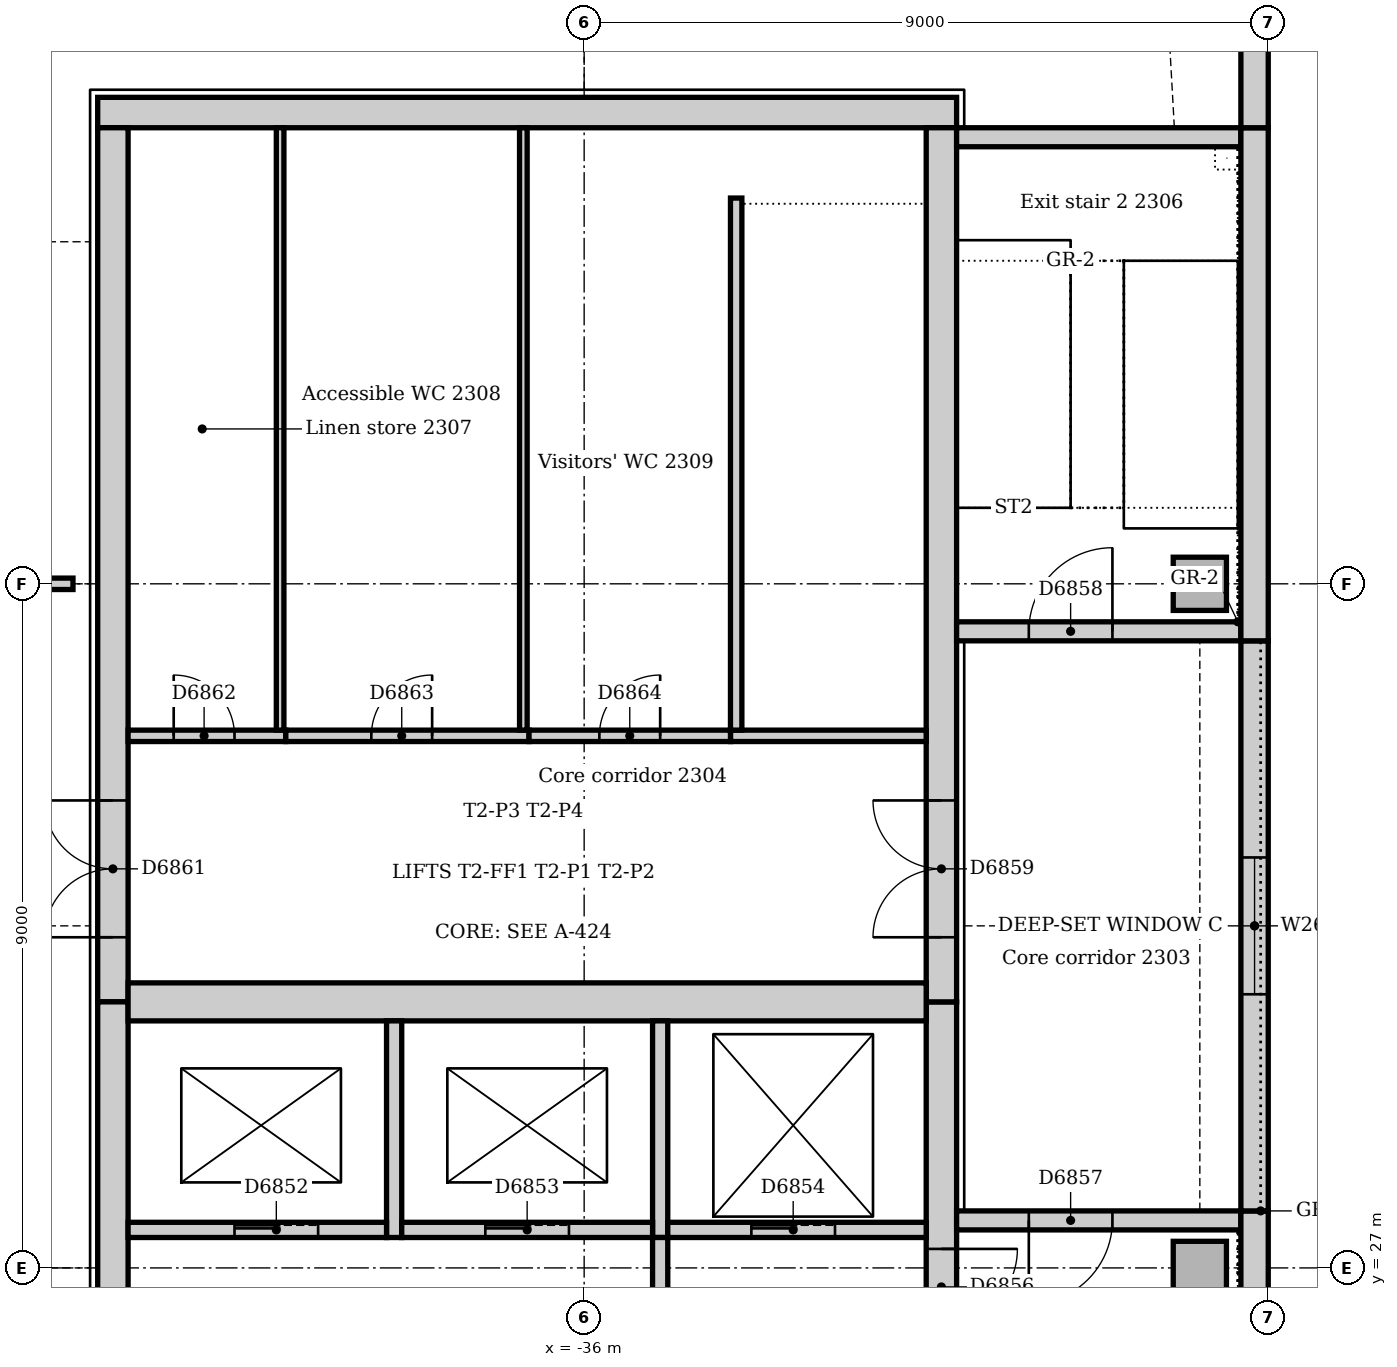
"""IFC4 building model, lengths in metres.
Left out: names, types, materials, properties, quantities, classifications, styles, units other than length and angle.
Written with IfcOpenShell. Run it as: python <this file> out.ifc"""

import sys

from ifc_helpers import new_model, si_unit, direction, frame, frame_2d, origin, origin_2d, place, context, subcontext, project, spatial, rectangle, extrude, element, fill, save


model = new_model("IFC4")
c1 = context("Model", 3, precision=1e-05, world=origin(), true_north=direction((0.0, 1.0)))
c2 = subcontext(c1, "Body", "Model", "MODEL_VIEW")
j1 = project(units=[si_unit("LENGTHUNIT", "METRE"), si_unit("PLANEANGLEUNIT", "RADIAN")], contexts=[c1])
p1 = place(None, origin())
s1 = spatial("IfcSite", under=j1, at=p1, CompositionType="ELEMENT")
p2 = place(p1, origin())
s2 = spatial("IfcBuilding", under=s1, at=p2, CompositionType="ELEMENT")
p3 = place(p2, frame((0.0, 0.0, 100.0)))
s3 = spatial("IfcBuildingStorey", under=s2, at=p3, CompositionType="ELEMENT", Elevation=100.0)
p4 = place(p3, frame((-31.1, 42.2, 0.0), z_axis=(0.0, 0.0, 1.0), x_axis=(-1.0, 0.0, 0.0)))
e1 = element("IfcWall", 1, at=p4, inside=s3, PredefinedType="SOLIDWALL", context=c2, shape_type="SweptSolid", body=[
    extrude(rectangle(XDim=11.3, YDim=0.4, at=frame_2d((5.65, 0.0))), origin(), (0.0, 0.0, 1.0), 4.0),
])
p5 = place(p3, frame((-31.3, 21.0, 0.0), z_axis=(0.0, 0.0, 1.0), x_axis=(0.0, 1.0, 0.0)))
e2 = element("IfcWall", 2, at=p5, inside=s3, PredefinedType="SOLIDWALL", context=c2, shape_type="SweptSolid", body=[
    extrude(rectangle(XDim=9.5, YDim=0.4, at=frame_2d((4.75, 0.0))), origin(), (0.0, 0.0, 1.0), 4.0),
])
p6 = place(p5, frame((5.25, 0.0, 0.0)))
e3 = element("IfcOpeningElement", 3, at=p6, cuts=e2, PredefinedType="OPENING", context=c2, shape_type="SweptSolid", body=[
    extrude(rectangle(XDim=1.0, YDim=2.1, at=frame_2d((0.5, 1.05))), frame((0.0, 0.21, 0.0), z_axis=(0.0, -1.0, 0.0), x_axis=(1.0, 0.0, 0.0)), (0.0, 0.0, 1.0), 0.42),
])
p7 = place(p3, frame((-31.3, 30.5, 0.0), z_axis=(0.0, 0.0, 1.0), x_axis=(0.0, 1.0, 0.0)))
e4 = element("IfcWall", 4, at=p7, inside=s3, PredefinedType="SOLIDWALL", context=c2, shape_type="SweptSolid", body=[
    extrude(rectangle(XDim=11.5, YDim=0.4, at=frame_2d((5.75, 0.0))), origin(), (0.0, 0.0, 1.0), 4.0),
])
p8 = place(p7, frame((0.85, 0.0, 0.0)))
e5 = element("IfcOpeningElement", 5, at=p8, cuts=e4, PredefinedType="OPENING", context=c2, shape_type="SweptSolid", body=[
    extrude(rectangle(XDim=1.8, YDim=2.1, at=frame_2d((0.9, 1.05))), frame((0.0, 0.21, 0.0), z_axis=(0.0, -1.0, 0.0), x_axis=(1.0, 0.0, 0.0)), (0.0, 0.0, 1.0), 0.42),
])
p9 = place(p3, frame((-42.2, 42.0, 0.0), z_axis=(0.0, 0.0, 1.0), x_axis=(0.0, -1.0, 0.0)))
e6 = element("IfcWall", 6, at=p9, inside=s3, PredefinedType="SOLIDWALL", context=c2, shape_type="SweptSolid", body=[
    extrude(rectangle(XDim=11.5, YDim=0.4, at=frame_2d((5.75, 0.0))), origin(), (0.0, 0.0, 1.0), 4.0),
])
p10 = place(p9, frame((8.85, 0.0, 0.0)))
e7 = element("IfcOpeningElement", 7, at=p10, cuts=e6, PredefinedType="OPENING", context=c2, shape_type="SweptSolid", body=[
    extrude(rectangle(XDim=1.8, YDim=2.1, at=frame_2d((0.9, 1.05))), frame((0.0, 0.21, 0.0), z_axis=(0.0, -1.0, 0.0), x_axis=(1.0, 0.0, 0.0)), (0.0, 0.0, 1.0), 0.42),
])
p11 = place(p3, frame((-42.2, 30.5, 0.0), z_axis=(0.0, 0.0, 1.0), x_axis=(0.0, -1.0, 0.0)))
e8 = element("IfcWall", 8, at=p11, inside=s3, PredefinedType="SOLIDWALL", context=c2, shape_type="SweptSolid", body=[
    extrude(rectangle(XDim=9.5, YDim=0.4, at=frame_2d((4.75, 0.0))), origin(), (0.0, 0.0, 1.0), 4.0),
])
p12 = place(p11, frame((3.85, 0.0, 0.0)))
e9 = element("IfcOpeningElement", 9, at=p12, cuts=e8, PredefinedType="OPENING", context=c2, shape_type="SweptSolid", body=[
    extrude(rectangle(XDim=1.8, YDim=2.1, at=frame_2d((0.9, 1.05))), frame((0.0, 0.21, 0.0), z_axis=(0.0, -1.0, 0.0), x_axis=(1.0, 0.0, 0.0)), (0.0, 0.0, 1.0), 0.42),
])
p13 = place(p3, frame((-42.0, 30.5, 0.0), z_axis=(0.0, 0.0, 1.0), x_axis=(1.0, 0.0, 0.0)))
e10 = element("IfcWall", 10, at=p13, inside=s3, PredefinedType="SOLIDWALL", context=c2, shape_type="SweptSolid", body=[
    extrude(rectangle(XDim=10.5, YDim=0.5, at=frame_2d((5.25, 0.0))), origin(), (0.0, 0.0, 1.0), 4.0),
])
p14 = place(p3, frame((-27.36, 27.625, 0.0), z_axis=(0.0, 0.0, 1.0), x_axis=(-1.0, 0.0, 0.0)))
e11 = element("IfcWall", 11, at=p14, inside=s3, PredefinedType="SOLIDWALL", context=c2, shape_type="SweptSolid", body=[
    extrude(rectangle(XDim=3.74, YDim=0.25, at=frame_2d((1.87, 0.0))), origin(), (0.0, 0.0, 1.0), 4.0),
])
p15 = place(p14, frame((1.69, 0.0, 0.0)))
e12 = element("IfcOpeningElement", 12, at=p15, cuts=e11, PredefinedType="OPENING", context=c2, shape_type="SweptSolid", body=[
    extrude(rectangle(XDim=1.1, YDim=2.1, at=frame_2d((0.55, 1.05))), frame((0.0, 0.135, 0.0), z_axis=(0.0, -1.0, 0.0), x_axis=(1.0, 0.0, 0.0)), (0.0, 0.0, 1.0), 0.27),
])
p16 = place(p3, frame((-31.1, 35.375, 0.0), z_axis=(0.0, 0.0, 1.0), x_axis=(1.0, 0.0, 0.0)))
e13 = element("IfcWall", 13, at=p16, inside=s3, PredefinedType="SOLIDWALL", context=c2, shape_type="SweptSolid", body=[
    extrude(rectangle(XDim=3.74, YDim=0.25, at=frame_2d((1.87, 0.0))), origin(), (0.0, 0.0, 1.0), 4.0),
])
p17 = place(p16, frame((0.95, 0.0, 0.0)))
e14 = element("IfcOpeningElement", 14, at=p17, cuts=e13, PredefinedType="OPENING", context=c2, shape_type="SweptSolid", body=[
    extrude(rectangle(XDim=1.1, YDim=2.1, at=frame_2d((0.55, 1.05))), frame((0.0, 0.135, 0.0), z_axis=(0.0, -1.0, 0.0), x_axis=(1.0, 0.0, 0.0)), (0.0, 0.0, 1.0), 0.27),
])
p18 = place(p3, frame((-27.36, 41.875, 0.0), z_axis=(0.0, 0.0, 1.0), x_axis=(-1.0, 0.0, 0.0)))
e15 = element("IfcWall", 15, at=p18, inside=s3, PredefinedType="SOLIDWALL", context=c2, shape_type="SweptSolid", body=[
    extrude(rectangle(XDim=3.74, YDim=0.25, at=frame_2d((1.87, 0.0))), origin(), (0.0, 0.0, 1.0), 4.0),
])
for number, where, z_axis, x_axis in (
    (16, (-27.9, 27.0, 0.0), (0.0, 0.0, 1.0), (1.0, 0.0, 0.0)),
    (17, (-27.9, 36.0, 0.0), (0.0, 0.0, 1.0), (1.0, 0.0, 0.0)),
):
    element("IfcColumn", number, at=place(p3, frame(where, z_axis=z_axis, x_axis=x_axis)), inside=s3, PredefinedType="COLUMN", context=c2, shape_type="SweptSolid", body=[
        extrude(rectangle(XDim=0.7, YDim=0.7, at=origin_2d()), origin(), (0.0, 0.0, 1.0), 4.0),
    ])
p19 = place(p3, frame((-27.18, 21.0, 0.0), z_axis=(0.0, 0.0, 1.0), x_axis=(0.0, 1.0, 0.0)))
e18 = element("IfcWall", 18, at=p19, inside=s3, PredefinedType="STANDARD", context=c2, shape_type="SweptSolid", body=[
    extrude(rectangle(XDim=6.75, YDim=0.36, at=frame_2d((3.375, 0.0))), origin(), (0.0, 0.0, 1.0), 3.85),
])
p20 = place(p3, frame((-27.18, 27.75, 0.0), z_axis=(0.0, 0.0, 1.0), x_axis=(0.0, 1.0, 0.0)))
e19 = element("IfcWall", 19, at=p20, inside=s3, PredefinedType="STANDARD", context=c2, shape_type="SweptSolid", body=[
    extrude(rectangle(XDim=7.5, YDim=0.36, at=frame_2d((3.75, 0.0))), origin(), (0.0, 0.0, 1.0), 3.85),
])
p21 = place(p20, frame((2.85, 0.0, 1.2)))
e20 = element("IfcOpeningElement", 20, at=p21, cuts=e19, PredefinedType="OPENING", context=c2, shape_type="SweptSolid", body=[
    extrude(rectangle(XDim=1.8, YDim=1.2, at=frame_2d((0.9, 0.6))), frame((0.0, 0.19, 0.0), z_axis=(0.0, -1.0, 0.0), x_axis=(1.0, 0.0, 0.0)), (0.0, 0.0, 1.0), 0.38),
])
p22 = place(p3, frame((-27.18, 35.25, 0.0), z_axis=(0.0, 0.0, 1.0), x_axis=(0.0, 1.0, 0.0)))
e21 = element("IfcWall", 21, at=p22, inside=s3, PredefinedType="STANDARD", context=c2, shape_type="SweptSolid", body=[
    extrude(rectangle(XDim=6.75, YDim=0.36, at=frame_2d((3.375, 0.0))), origin(), (0.0, 0.0, 1.0), 3.85),
])
p23 = place(p3, frame((-27.18, 42.0, 0.0), z_axis=(0.0, 0.0, 1.0), x_axis=(0.0, 1.0, 0.0)))
e22 = element("IfcWall", 22, at=p23, inside=s3, PredefinedType="STANDARD", context=c2, shape_type="SweptSolid", body=[
    extrude(rectangle(XDim=3.257, YDim=0.36, at=frame_2d((1.629, 0.0))), origin(), (0.0, 0.0, 1.0), 3.85),
])
p24 = place(p3, frame((-38.5, 27.4, 0.0), z_axis=(0.0, 0.0, 1.0), x_axis=(0.0, 1.0, 0.0)))
e23 = element("IfcWall", 23, at=p24, inside=s3, PredefinedType="SOLIDWALL", context=c2, shape_type="SweptSolid", body=[
    extrude(rectangle(XDim=2.85, YDim=0.2, at=frame_2d((1.425, 0.0))), origin(), (0.0, 0.0, 1.0), 4.0),
])
p25 = place(p3, frame((-42.0, 27.5, 0.0), z_axis=(0.0, 0.0, 1.0), x_axis=(1.0, 0.0, 0.0)))
e24 = element("IfcWall", 24, at=p25, inside=s3, PredefinedType="SOLIDWALL", context=c2, shape_type="SweptSolid", body=[
    extrude(rectangle(XDim=3.4, YDim=0.2, at=frame_2d((1.7, 0.0))), origin(), (0.0, 0.0, 1.0), 4.0),
])
p26 = place(p25, frame((1.4, 0.0, 0.0)))
e25 = element("IfcOpeningElement", 25, at=p26, cuts=e24, PredefinedType="OPENING", context=c2, shape_type="SweptSolid", body=[
    extrude(rectangle(XDim=1.1, YDim=2.1, at=frame_2d((0.55, 1.05))), frame((0.0, 0.11, 0.0), z_axis=(0.0, -1.0, 0.0), x_axis=(1.0, 0.0, 0.0)), (0.0, 0.0, 1.0), 0.22),
])
p27 = place(p3, frame((-35.0, 27.4, 0.0), z_axis=(0.0, 0.0, 1.0), x_axis=(0.0, 1.0, 0.0)))
e26 = element("IfcWall", 26, at=p27, inside=s3, PredefinedType="SOLIDWALL", context=c2, shape_type="SweptSolid", body=[
    extrude(rectangle(XDim=2.85, YDim=0.2, at=frame_2d((1.425, 0.0))), origin(), (0.0, 0.0, 1.0), 4.0),
])
p28 = place(p3, frame((-38.4, 27.5, 0.0), z_axis=(0.0, 0.0, 1.0), x_axis=(1.0, 0.0, 0.0)))
e27 = element("IfcWall", 27, at=p28, inside=s3, PredefinedType="SOLIDWALL", context=c2, shape_type="SweptSolid", body=[
    extrude(rectangle(XDim=3.3, YDim=0.2, at=frame_2d((1.65, 0.0))), origin(), (0.0, 0.0, 1.0), 4.0),
])
p29 = place(p28, frame((1.1, 0.0, 0.0)))
e28 = element("IfcOpeningElement", 28, at=p29, cuts=e27, PredefinedType="OPENING", context=c2, shape_type="SweptSolid", body=[
    extrude(rectangle(XDim=1.1, YDim=2.1, at=frame_2d((0.55, 1.05))), frame((0.0, 0.11, 0.0), z_axis=(0.0, -1.0, 0.0), x_axis=(1.0, 0.0, 0.0)), (0.0, 0.0, 1.0), 0.22),
])
p30 = place(p3, frame((-34.9, 27.5, 0.0), z_axis=(0.0, 0.0, 1.0), x_axis=(1.0, 0.0, 0.0)))
e29 = element("IfcWall", 29, at=p30, inside=s3, PredefinedType="SOLIDWALL", context=c2, shape_type="SweptSolid", body=[
    extrude(rectangle(XDim=3.4, YDim=0.2, at=frame_2d((1.7, 0.0))), origin(), (0.0, 0.0, 1.0), 4.0),
])
p31 = place(p30, frame((1.1, 0.0, 0.0)))
e30 = element("IfcOpeningElement", 30, at=p31, cuts=e29, PredefinedType="OPENING", context=c2, shape_type="SweptSolid", body=[
    extrude(rectangle(XDim=1.1, YDim=2.1, at=frame_2d((0.55, 1.05))), frame((0.0, 0.11, 0.0), z_axis=(0.0, -1.0, 0.0), x_axis=(1.0, 0.0, 0.0)), (0.0, 0.0, 1.0), 0.22),
])
p32 = place(p3, frame((-35.0, 24.1, 0.0), z_axis=(0.0, 0.0, 1.0), x_axis=(0.0, 1.0, 0.0)))
e31 = element("IfcWall", 31, at=p32, inside=s3, PredefinedType="SOLIDWALL", context=c2, shape_type="SweptSolid", body=[
    extrude(rectangle(XDim=3.3, YDim=0.2, at=frame_2d((1.65, 0.0))), origin(), (0.0, 0.0, 1.0), 4.0),
])
p33 = place(p32, frame((1.15, 0.0, 0.0)))
e32 = element("IfcOpeningElement", 32, at=p33, cuts=e31, PredefinedType="OPENING", context=c2, shape_type="SweptSolid", body=[
    extrude(rectangle(XDim=1.0, YDim=2.1, at=frame_2d((0.5, 1.05))), frame((0.0, 0.11, 0.0), z_axis=(0.0, -1.0, 0.0), x_axis=(1.0, 0.0, 0.0)), (0.0, 0.0, 1.0), 0.22),
])
p34 = place(p3, frame((-34.075, 34.0, 0.0), z_axis=(0.0, 0.0, 1.0), x_axis=(1.0, 0.0, 0.0)))
e33 = element("IfcWall", 33, at=p34, inside=s3, PredefinedType="SOLIDWALL", context=c2, shape_type="SweptSolid", body=[
    extrude(rectangle(XDim=2.575, YDim=0.15, at=frame_2d((1.288, 0.0))), origin(), (0.0, 0.0, 1.0), 4.0),
])
p35 = place(p3, frame((-34.0, 41.075, 0.0), z_axis=(0.0, 0.0, 1.0), x_axis=(0.0, -1.0, 0.0)))
e34 = element("IfcWall", 34, at=p35, inside=s3, PredefinedType="SOLIDWALL", context=c2, shape_type="SweptSolid", body=[
    extrude(rectangle(XDim=7.0, YDim=0.15, at=frame_2d((3.5, 0.0))), origin(), (0.0, 0.0, 1.0), 4.0),
])
p36 = place(p3, frame((-39.925, 34.0, 0.0), z_axis=(0.0, 0.0, 1.0), x_axis=(-1.0, 0.0, 0.0)))
e35 = element("IfcWall", 35, at=p36, inside=s3, PredefinedType="PARTITIONING", context=c2, shape_type="SweptSolid", body=[
    extrude(rectangle(XDim=2.075, YDim=0.15, at=frame_2d((1.038, 0.0))), origin(), (0.0, 0.0, 1.0), 3.85),
])
p37 = place(p36, frame((0.675, 0.0, 0.0)))
e36 = element("IfcOpeningElement", 36, at=p37, cuts=e35, PredefinedType="OPENING", context=c2, shape_type="SweptSolid", body=[
    extrude(rectangle(XDim=0.8, YDim=2.1, at=frame_2d((0.4, 1.05))), frame((0.0, 0.085, 0.0), z_axis=(0.0, -1.0, 0.0), x_axis=(1.0, 0.0, 0.0)), (0.0, 0.0, 1.0), 0.17),
])
p38 = place(p3, frame((-36.725, 34.0, 0.0), z_axis=(0.0, 0.0, 1.0), x_axis=(-1.0, 0.0, 0.0)))
e37 = element("IfcWall", 37, at=p38, inside=s3, PredefinedType="PARTITIONING", context=c2, shape_type="SweptSolid", body=[
    extrude(rectangle(XDim=3.2, YDim=0.15, at=frame_2d((1.6, 0.0))), origin(), (0.0, 0.0, 1.0), 3.85),
])
p39 = place(p38, frame((1.275, 0.0, 0.0)))
e38 = element("IfcOpeningElement", 38, at=p39, cuts=e37, PredefinedType="OPENING", context=c2, shape_type="SweptSolid", body=[
    extrude(rectangle(XDim=0.8, YDim=2.1, at=frame_2d((0.4, 1.05))), frame((0.0, 0.085, 0.0), z_axis=(0.0, -1.0, 0.0), x_axis=(1.0, 0.0, 0.0)), (0.0, 0.0, 1.0), 0.17),
])
p40 = place(p3, frame((-34.075, 34.0, 0.0), z_axis=(0.0, 0.0, 1.0), x_axis=(-1.0, 0.0, 0.0)))
e39 = element("IfcWall", 39, at=p40, inside=s3, PredefinedType="PARTITIONING", context=c2, shape_type="SweptSolid", body=[
    extrude(rectangle(XDim=2.65, YDim=0.15, at=frame_2d((1.325, 0.0))), origin(), (0.0, 0.0, 1.0), 3.85),
])
p41 = place(p40, frame((0.925, 0.0, 0.0)))
e40 = element("IfcOpeningElement", 40, at=p41, cuts=e39, PredefinedType="OPENING", context=c2, shape_type="SweptSolid", body=[
    extrude(rectangle(XDim=0.8, YDim=2.1, at=frame_2d((0.4, 1.05))), frame((0.0, 0.085, 0.0), z_axis=(0.0, -1.0, 0.0), x_axis=(1.0, 0.0, 0.0)), (0.0, 0.0, 1.0), 0.17),
])
for number, where, z_axis, x_axis in (
    (41, (-40.0, 34.075, 0.0), (0.0, 0.0, 1.0), (0.0, 1.0, 0.0)),
    (42, (-36.8, 34.075, 0.0), (0.0, 0.0, 1.0), (0.0, 1.0, 0.0)),
):
    element("IfcWall", number, at=place(p3, frame(where, z_axis=z_axis, x_axis=x_axis)), inside=s3, PredefinedType="PARTITIONING", context=c2, shape_type="SweptSolid", body=[
        extrude(rectangle(XDim=7.925, YDim=0.1, at=frame_2d((3.962, 0.0))), origin(), (0.0, 0.0, 1.0), 3.85),
    ])
p42 = place(p3, frame((-44.7, 36.0, 0.0), z_axis=(0.0, 0.0, 1.0), x_axis=(1.0, 0.0, 0.0)))
e43 = element("IfcWall", 43, at=p42, inside=s3, PredefinedType="PARTITIONING", context=c2, shape_type="SweptSolid", body=[
    extrude(rectangle(XDim=1.975, YDim=0.15, at=frame_2d((0.988, 0.0))), origin(), (0.0, 0.0, 1.0), 3.602),
])
p43 = place(p42, frame((0.55, 0.0, 0.0)))
e44 = element("IfcOpeningElement", 44, at=p43, cuts=e43, PredefinedType="OPENING", context=c2, shape_type="SweptSolid", body=[
    extrude(rectangle(XDim=0.9, YDim=2.1, at=frame_2d((0.45, 1.05))), frame((0.0, 0.085, 0.0), z_axis=(0.0, -1.0, 0.0), x_axis=(1.0, 0.0, 0.0)), (0.0, 0.0, 1.0), 0.17),
])
p44 = place(p21, origin())
e45 = element("IfcWindow", 45, at=p44, inside=s3, PartitioningType="SINGLE_PANEL", PredefinedType="WINDOW", context=c2, shape_type="SweptSolid", body=[
    extrude(rectangle(XDim=1.8, YDim=1.2, at=frame_2d((0.9, 0.6))), frame((0.0, 0.13, 0.0), z_axis=(0.0, -1.0, 0.0), x_axis=(1.0, 0.0, 0.0)), (0.0, 0.0, 1.0), 0.06),
])
fill(e20, e45)
p45 = place(p26, origin())
e46 = element("IfcDoor", 46, at=p45, inside=s3, OperationType="SLIDING_TO_LEFT", PredefinedType="DOOR", context=c2, shape_type="SweptSolid", body=[
    extrude(rectangle(XDim=1.1, YDim=2.1, at=frame_2d((0.55, 1.05))), frame((0.0, 0.025, 0.0), z_axis=(0.0, -1.0, 0.0), x_axis=(1.0, 0.0, 0.0)), (0.0, 0.0, 1.0), 0.05),
])
fill(e25, e46)
p46 = place(p29, origin())
e47 = element("IfcDoor", 47, at=p46, inside=s3, OperationType="SLIDING_TO_LEFT", PredefinedType="DOOR", context=c2, shape_type="SweptSolid", body=[
    extrude(rectangle(XDim=1.1, YDim=2.1, at=frame_2d((0.55, 1.05))), frame((0.0, 0.025, 0.0), z_axis=(0.0, -1.0, 0.0), x_axis=(1.0, 0.0, 0.0)), (0.0, 0.0, 1.0), 0.05),
])
fill(e28, e47)
p47 = place(p31, origin())
e48 = element("IfcDoor", 48, at=p47, inside=s3, OperationType="SLIDING_TO_LEFT", PredefinedType="DOOR", context=c2, shape_type="SweptSolid", body=[
    extrude(rectangle(XDim=1.1, YDim=2.1, at=frame_2d((0.55, 1.05))), frame((0.0, 0.025, 0.0), z_axis=(0.0, -1.0, 0.0), x_axis=(1.0, 0.0, 0.0)), (0.0, 0.0, 1.0), 0.05),
])
fill(e30, e48)
p48 = place(p6, frame((1.0, 0.0, 0.0), z_axis=(0.0, 0.0, 1.0), x_axis=(-1.0, 0.0, 0.0)))
e49 = element("IfcDoor", 49, at=p48, inside=s3, OperationType="SINGLE_SWING_LEFT", PredefinedType="DOOR", context=c2, shape_type="SweptSolid", body=[
    extrude(rectangle(XDim=1.0, YDim=2.1, at=frame_2d((0.5, 1.05))), frame((0.0, 0.025, 0.0), z_axis=(0.0, -1.0, 0.0), x_axis=(1.0, 0.0, 0.0)), (0.0, 0.0, 1.0), 0.05),
])
fill(e3, e49)
p49 = place(p15, origin())
e50 = element("IfcDoor", 50, at=p49, inside=s3, OperationType="SINGLE_SWING_RIGHT", PredefinedType="DOOR", context=c2, shape_type="SweptSolid", body=[
    extrude(rectangle(XDim=1.1, YDim=2.1, at=frame_2d((0.55, 1.05))), frame((0.0, 0.025, 0.0), z_axis=(0.0, -1.0, 0.0), x_axis=(1.0, 0.0, 0.0)), (0.0, 0.0, 1.0), 0.05),
])
fill(e12, e50)
p50 = place(p17, origin())
e51 = element("IfcDoor", 51, at=p50, inside=s3, OperationType="SINGLE_SWING_RIGHT", PredefinedType="DOOR", context=c2, shape_type="SweptSolid", body=[
    extrude(rectangle(XDim=1.1, YDim=2.1, at=frame_2d((0.55, 1.05))), frame((0.0, 0.025, 0.0), z_axis=(0.0, -1.0, 0.0), x_axis=(1.0, 0.0, 0.0)), (0.0, 0.0, 1.0), 0.05),
])
fill(e14, e51)
p51 = place(p8, origin())
e52 = element("IfcDoor", 52, at=p51, inside=s3, OperationType="DOUBLE_DOOR_SINGLE_SWING", PredefinedType="DOOR", context=c2, shape_type="SweptSolid", body=[
    extrude(rectangle(XDim=1.8, YDim=2.1, at=frame_2d((0.9, 1.05))), frame((0.0, 0.025, 0.0), z_axis=(0.0, -1.0, 0.0), x_axis=(1.0, 0.0, 0.0)), (0.0, 0.0, 1.0), 0.05),
])
fill(e5, e52)
p52 = place(p10, frame((1.8, 0.0, 0.0), z_axis=(0.0, 0.0, 1.0), x_axis=(-1.0, 0.0, 0.0)))
e53 = element("IfcDoor", 53, at=p52, inside=s3, OperationType="DOUBLE_DOOR_SINGLE_SWING", PredefinedType="DOOR", context=c2, shape_type="SweptSolid", body=[
    extrude(rectangle(XDim=1.8, YDim=2.1, at=frame_2d((0.9, 1.05))), frame((0.0, 0.025, 0.0), z_axis=(0.0, -1.0, 0.0), x_axis=(1.0, 0.0, 0.0)), (0.0, 0.0, 1.0), 0.05),
])
fill(e7, e53)
p53 = place(p37, frame((0.8, 0.0, 0.0), z_axis=(0.0, 0.0, 1.0), x_axis=(-1.0, 0.0, 0.0)))
e54 = element("IfcDoor", 54, at=p53, inside=s3, OperationType="SINGLE_SWING_LEFT", PredefinedType="DOOR", context=c2, shape_type="SweptSolid", body=[
    extrude(rectangle(XDim=0.8, YDim=2.1, at=frame_2d((0.4, 1.05))), frame((0.0, 0.025, 0.0), z_axis=(0.0, -1.0, 0.0), x_axis=(1.0, 0.0, 0.0)), (0.0, 0.0, 1.0), 0.05),
])
fill(e36, e54)
p54 = place(p39, frame((0.8, 0.0, 0.0), z_axis=(0.0, 0.0, 1.0), x_axis=(-1.0, 0.0, 0.0)))
e55 = element("IfcDoor", 55, at=p54, inside=s3, OperationType="SINGLE_SWING_RIGHT", PredefinedType="DOOR", context=c2, shape_type="SweptSolid", body=[
    extrude(rectangle(XDim=0.8, YDim=2.1, at=frame_2d((0.4, 1.05))), frame((0.0, 0.025, 0.0), z_axis=(0.0, -1.0, 0.0), x_axis=(1.0, 0.0, 0.0)), (0.0, 0.0, 1.0), 0.05),
])
fill(e38, e55)
p55 = place(p41, frame((0.8, 0.0, 0.0), z_axis=(0.0, 0.0, 1.0), x_axis=(-1.0, 0.0, 0.0)))
e56 = element("IfcDoor", 56, at=p55, inside=s3, OperationType="SINGLE_SWING_RIGHT", PredefinedType="DOOR", context=c2, shape_type="SweptSolid", body=[
    extrude(rectangle(XDim=0.8, YDim=2.1, at=frame_2d((0.4, 1.05))), frame((0.0, 0.025, 0.0), z_axis=(0.0, -1.0, 0.0), x_axis=(1.0, 0.0, 0.0)), (0.0, 0.0, 1.0), 0.05),
])
fill(e40, e56)
save(model, sys.argv[1])
